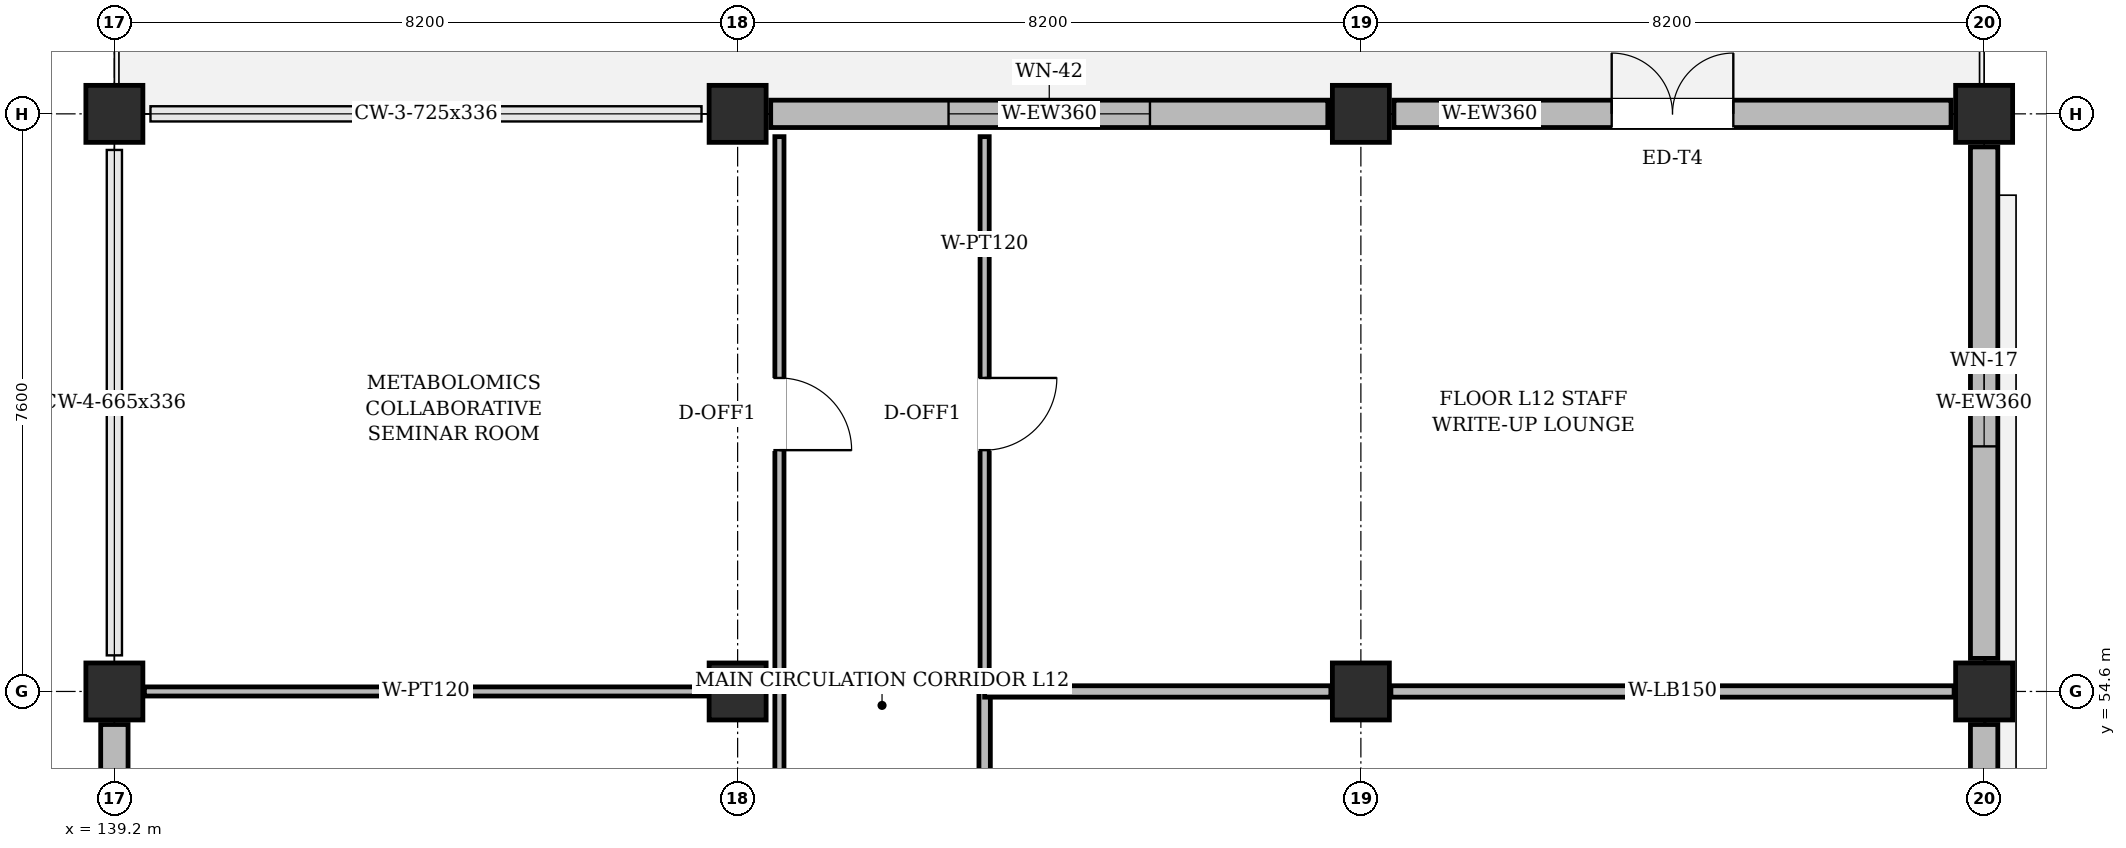
"""IFC4 building model, lengths in metres.
Left out: names, types, materials, properties, quantities, classifications, styles, units other than length and angle.
Written with IfcOpenShell. Run it as: python <this file> out.ifc"""

import sys

from ifc_helpers import new_model, si_unit, direction, frame, frame_2d, origin, origin_2d, place, context, subcontext, project, spatial, rectangle, extrude, element, fill, save


model = new_model("IFC4")
c1 = context("Model", 3, precision=1e-05, world=origin(), true_north=direction((0.0, 1.0)))
c2 = subcontext(c1, "Body", "Model", "MODEL_VIEW")
j1 = project(units=[si_unit("LENGTHUNIT", "METRE"), si_unit("PLANEANGLEUNIT", "RADIAN")], contexts=[c1])
p1 = place(None, origin())
s1 = spatial("IfcSite", under=j1, at=p1, CompositionType="ELEMENT")
p2 = place(p1, origin())
s2 = spatial("IfcBuilding", under=s1, at=p2, CompositionType="ELEMENT")
p3 = place(p2, frame((0.0, 0.0, 53.4)))
s3 = spatial("IfcBuildingStorey", under=s2, at=p3, CompositionType="ELEMENT", Elevation=53.4)
for number, where, z_axis, x_axis in (
    (1, (139.2, 54.6, 0.0), (0.0, 0.0, 1.0), (1.0, 0.0, 0.0)),
    (2, (139.2, 62.2, 0.0), (0.0, 0.0, 1.0), (1.0, 0.0, 0.0)),
    (3, (147.4, 54.6, 0.0), (0.0, 0.0, 1.0), (1.0, 0.0, 0.0)),
    (4, (147.4, 62.2, 0.0), (0.0, 0.0, 1.0), (1.0, 0.0, 0.0)),
    (5, (155.6, 54.6, 0.0), (0.0, 0.0, 1.0), (1.0, 0.0, 0.0)),
    (6, (155.6, 62.2, 0.0), (0.0, 0.0, 1.0), (1.0, 0.0, 0.0)),
    (7, (163.8, 54.6, 0.0), (0.0, 0.0, 1.0), (1.0, 0.0, 0.0)),
    (8, (163.8, 62.2, 0.0), (0.0, 0.0, 1.0), (1.0, 0.0, 0.0)),
):
    element("IfcColumn", number, at=place(p3, frame(where, z_axis=z_axis, x_axis=x_axis)), inside=s3, PredefinedType="COLUMN", context=c2, shape_type="SweptSolid", body=[
        extrude(rectangle(XDim=0.75, YDim=0.75, at=origin_2d()), origin(), (0.0, 0.0, 1.0), 3.96),
    ])
p4 = place(p3, frame((163.8, 47.435, 0.0), z_axis=(0.0, 0.0, 1.0), x_axis=(0.0, 1.0, 0.0)))
e9 = element("IfcWall", 9, at=p4, inside=s3, PredefinedType="SOLIDWALL", context=c2, shape_type="SweptSolid", body=[
    extrude(rectangle(XDim=6.73, YDim=0.36, at=frame_2d((3.365, 0.0))), origin(), (0.0, 0.0, 1.0), 3.345),
])
p5 = place(p4, frame((2.89, 0.0, 0.95)))
e10 = element("IfcOpeningElement", 10, at=p5, cuts=e9, PredefinedType="OPENING", context=c2, shape_type="SweptSolid", body=[
    extrude(rectangle(XDim=0.95, YDim=1.5, at=frame_2d((0.475, 0.75))), frame((0.0, 0.192, 0.0), z_axis=(0.0, -1.0, 0.0), x_axis=(1.0, 0.0, 0.0)), (0.0, 0.0, 1.0), 0.384),
])
p6 = place(p3, frame((163.8, 55.035, 0.0), z_axis=(0.0, 0.0, 1.0), x_axis=(0.0, 1.0, 0.0)))
e11 = element("IfcWall", 11, at=p6, inside=s3, PredefinedType="SOLIDWALL", context=c2, shape_type="SweptSolid", body=[
    extrude(rectangle(XDim=6.73, YDim=0.36, at=frame_2d((3.365, 0.0))), origin(), (0.0, 0.0, 1.0), 3.345),
])
p7 = place(p6, frame((2.79, 0.0, 0.95)))
e12 = element("IfcOpeningElement", 12, at=p7, cuts=e11, PredefinedType="OPENING", context=c2, shape_type="SweptSolid", body=[
    extrude(rectangle(XDim=1.15, YDim=1.25, at=frame_2d((0.575, 0.625))), frame((0.0, 0.192, 0.0), z_axis=(0.0, -1.0, 0.0), x_axis=(1.0, 0.0, 0.0)), (0.0, 0.0, 1.0), 0.384),
])
p8 = place(p3, frame((163.365, 62.2, 0.0), z_axis=(0.0, 0.0, 1.0), x_axis=(-1.0, 0.0, 0.0)))
e13 = element("IfcWall", 13, at=p8, inside=s3, PredefinedType="SOLIDWALL", context=c2, shape_type="SweptSolid", body=[
    extrude(rectangle(XDim=7.33, YDim=0.36, at=frame_2d((3.665, 0.0))), origin(), (0.0, 0.0, 1.0), 3.345),
])
p9 = place(p8, frame((2.865, 0.0, 0.0)))
e14 = element("IfcOpeningElement", 14, at=p9, cuts=e13, PredefinedType="OPENING", context=c2, shape_type="SweptSolid", body=[
    extrude(rectangle(XDim=1.6, YDim=2.2, at=frame_2d((0.8, 1.1))), frame((0.0, 0.192, 0.0), z_axis=(0.0, -1.0, 0.0), x_axis=(1.0, 0.0, 0.0)), (0.0, 0.0, 1.0), 0.384),
])
p10 = place(p3, frame((155.165, 62.2, 0.0), z_axis=(0.0, 0.0, 1.0), x_axis=(-1.0, 0.0, 0.0)))
e15 = element("IfcWall", 15, at=p10, inside=s3, PredefinedType="SOLIDWALL", context=c2, shape_type="SweptSolid", body=[
    extrude(rectangle(XDim=7.33, YDim=0.36, at=frame_2d((3.665, 0.0))), origin(), (0.0, 0.0, 1.0), 3.345),
])
p11 = place(p10, frame((2.34, 0.0, 0.95)))
e16 = element("IfcOpeningElement", 16, at=p11, cuts=e15, PredefinedType="OPENING", context=c2, shape_type="SweptSolid", body=[
    extrude(rectangle(XDim=2.65, YDim=1.5, at=frame_2d((1.325, 0.75))), frame((0.0, 0.192, 0.0), z_axis=(0.0, -1.0, 0.0), x_axis=(1.0, 0.0, 0.0)), (0.0, 0.0, 1.0), 0.384),
])
p12 = place(p3, frame((139.2, 54.165, 0.0), z_axis=(0.0, 0.0, 1.0), x_axis=(0.0, -1.0, 0.0)))
e17 = element("IfcWall", 17, at=p12, inside=s3, PredefinedType="SOLIDWALL", context=c2, shape_type="SweptSolid", body=[
    extrude(rectangle(XDim=6.73, YDim=0.36, at=frame_2d((3.365, 0.0))), origin(), (0.0, 0.0, 1.0), 3.345),
])
p13 = place(p12, frame((2.59, 0.0, 0.95)))
e18 = element("IfcOpeningElement", 18, at=p13, cuts=e17, PredefinedType="OPENING", context=c2, shape_type="SweptSolid", body=[
    extrude(rectangle(XDim=1.55, YDim=1.75, at=frame_2d((0.775, 0.875))), frame((0.0, 0.192, 0.0), z_axis=(0.0, -1.0, 0.0), x_axis=(1.0, 0.0, 0.0)), (0.0, 0.0, 1.0), 0.384),
])
p14 = place(p3, frame((150.65, 54.6, 0.0), z_axis=(0.0, 0.0, 1.0), x_axis=(0.0, -1.0, 0.0)))
e19 = element("IfcWall", 19, at=p14, inside=s3, PredefinedType="PARTITIONING", context=c2, shape_type="SweptSolid", body=[
    extrude(rectangle(XDim=18.35, YDim=0.15, at=frame_2d((9.175, 0.0))), origin(), (0.0, 0.0, 1.0), 3.805),
])
p15 = place(p14, frame((8.475, 0.0, 0.0)))
e20 = element("IfcOpeningElement", 20, at=p15, cuts=e19, PredefinedType="OPENING", context=c2, shape_type="SweptSolid", body=[
    extrude(rectangle(XDim=1.4, YDim=2.2, at=frame_2d((0.7, 1.1))), frame((0.0, 0.087, 0.0), z_axis=(0.0, -1.0, 0.0), x_axis=(1.0, 0.0, 0.0)), (0.0, 0.0, 1.0), 0.174),
])
p16 = place(p3, frame((147.95, 46.51, 0.0), z_axis=(0.0, 0.0, 1.0), x_axis=(0.0, 1.0, 0.0)))
e21 = element("IfcWall", 21, at=p16, inside=s3, PredefinedType="PARTITIONING", context=c2, shape_type="SweptSolid", body=[
    extrude(rectangle(XDim=8.09, YDim=0.12, at=frame_2d((4.045, 0.0))), origin(), (0.0, 0.0, 1.0), 3.805),
])
p17 = place(p16, frame((3.52, 0.0, 0.0)))
e22 = element("IfcOpeningElement", 22, at=p17, cuts=e21, PredefinedType="OPENING", context=c2, shape_type="SweptSolid", body=[
    extrude(rectangle(XDim=1.05, YDim=2.2, at=frame_2d((0.525, 1.1))), frame((0.0, 0.072, 0.0), z_axis=(0.0, -1.0, 0.0), x_axis=(1.0, 0.0, 0.0)), (0.0, 0.0, 1.0), 0.144),
])
p18 = place(p3, frame((147.95, 54.6, 0.0), z_axis=(0.0, 0.0, 1.0), x_axis=(0.0, 1.0, 0.0)))
e23 = element("IfcWall", 23, at=p18, inside=s3, PredefinedType="PARTITIONING", context=c2, shape_type="SweptSolid", body=[
    extrude(rectangle(XDim=7.3, YDim=0.12, at=frame_2d((3.65, 0.0))), origin(), (0.0, 0.0, 1.0), 3.805),
])
p19 = place(p18, frame((3.175, 0.0, 0.0)))
e24 = element("IfcOpeningElement", 24, at=p19, cuts=e23, PredefinedType="OPENING", context=c2, shape_type="SweptSolid", body=[
    extrude(rectangle(XDim=0.95, YDim=2.2, at=frame_2d((0.475, 1.1))), frame((0.0, 0.072, 0.0), z_axis=(0.0, -1.0, 0.0), x_axis=(1.0, 0.0, 0.0)), (0.0, 0.0, 1.0), 0.144),
])
p20 = place(p3, frame((150.65, 61.9, 0.0), z_axis=(0.0, 0.0, 1.0), x_axis=(0.0, -1.0, 0.0)))
e25 = element("IfcWall", 25, at=p20, inside=s3, PredefinedType="PARTITIONING", context=c2, shape_type="SweptSolid", body=[
    extrude(rectangle(XDim=7.3, YDim=0.12, at=frame_2d((3.65, 0.0))), origin(), (0.0, 0.0, 1.0), 3.805),
])
p21 = place(p20, frame((3.175, 0.0, 0.0)))
e26 = element("IfcOpeningElement", 26, at=p21, cuts=e25, PredefinedType="OPENING", context=c2, shape_type="SweptSolid", body=[
    extrude(rectangle(XDim=0.95, YDim=2.2, at=frame_2d((0.475, 1.1))), frame((0.0, 0.072, 0.0), z_axis=(0.0, -1.0, 0.0), x_axis=(1.0, 0.0, 0.0)), (0.0, 0.0, 1.0), 0.144),
])
p22 = place(p3, frame((150.65, 54.6, 0.0), z_axis=(0.0, 0.0, 1.0), x_axis=(1.0, 0.0, 0.0)))
e27 = element("IfcWall", 27, at=p22, inside=s3, PredefinedType="PARTITIONING", context=c2, shape_type="SweptSolid", body=[
    extrude(rectangle(XDim=4.555, YDim=0.15, at=frame_2d((2.278, 0.0))), origin(), (0.0, 0.0, 1.0), 3.295),
])
p23 = place(p3, frame((155.995, 54.6, 0.0), z_axis=(0.0, 0.0, 1.0), x_axis=(1.0, 0.0, 0.0)))
e28 = element("IfcWall", 28, at=p23, inside=s3, PredefinedType="PARTITIONING", context=c2, shape_type="SweptSolid", body=[
    extrude(rectangle(XDim=7.41, YDim=0.15, at=frame_2d((3.705, 0.0))), origin(), (0.0, 0.0, 1.0), 3.295),
])
p24 = place(p3, frame((139.595, 54.6, 0.0), z_axis=(0.0, 0.0, 1.0), x_axis=(1.0, 0.0, 0.0)))
e29 = element("IfcWall", 29, at=p24, inside=s3, PredefinedType="PARTITIONING", context=c2, shape_type="SweptSolid", body=[
    extrude(rectangle(XDim=7.41, YDim=0.12, at=frame_2d((3.705, 0.0))), origin(), (0.0, 0.0, 1.0), 3.295),
])
p25 = place(p7, origin())
e30 = element("IfcWindow", 30, at=p25, inside=s3, PartitioningType="SINGLE_PANEL", PredefinedType="WINDOW", context=c2, shape_type="SweptSolid", body=[
    extrude(rectangle(XDim=1.15, YDim=1.25, at=frame_2d((0.575, 0.625))), frame((0.0, 0.03, 0.0), z_axis=(0.0, -1.0, 0.0), x_axis=(1.0, 0.0, 0.0)), (0.0, 0.0, 1.0), 0.06),
])
fill(e12, e30)
p26 = place(p9, frame((1.6, 0.0, 0.0), z_axis=(0.0, 0.0, 1.0), x_axis=(-1.0, 0.0, 0.0)))
e31 = element("IfcDoor", 31, at=p26, inside=s3, OperationType="DOUBLE_DOOR_SINGLE_SWING", PredefinedType="DOOR", context=c2, shape_type="SweptSolid", body=[
    extrude(rectangle(XDim=1.6, YDim=2.2, at=frame_2d((0.8, 1.1))), frame((0.0, 0.025, 0.0), z_axis=(0.0, -1.0, 0.0), x_axis=(1.0, 0.0, 0.0)), (0.0, 0.0, 1.0), 0.05),
])
fill(e14, e31)
p27 = place(p11, origin())
e32 = element("IfcWindow", 32, at=p27, inside=s3, PartitioningType="DOUBLE_PANEL_VERTICAL", PredefinedType="WINDOW", context=c2, shape_type="SweptSolid", body=[
    extrude(rectangle(XDim=2.65, YDim=1.5, at=frame_2d((1.325, 0.75))), frame((0.0, 0.03, 0.0), z_axis=(0.0, -1.0, 0.0), x_axis=(1.0, 0.0, 0.0)), (0.0, 0.0, 1.0), 0.06),
])
fill(e16, e32)
p28 = place(p19, frame((0.95, 0.0, 0.0), z_axis=(0.0, 0.0, 1.0), x_axis=(-1.0, 0.0, 0.0)))
e33 = element("IfcDoor", 33, at=p28, inside=s3, OperationType="SINGLE_SWING_RIGHT", PredefinedType="DOOR", context=c2, shape_type="SweptSolid", body=[
    extrude(rectangle(XDim=0.95, YDim=2.2, at=frame_2d((0.475, 1.1))), frame((0.0, 0.025, 0.0), z_axis=(0.0, -1.0, 0.0), x_axis=(1.0, 0.0, 0.0)), (0.0, 0.0, 1.0), 0.05),
])
fill(e24, e33)
p29 = place(p21, origin())
e34 = element("IfcDoor", 34, at=p29, inside=s3, OperationType="SINGLE_SWING_LEFT", PredefinedType="DOOR", context=c2, shape_type="SweptSolid", body=[
    extrude(rectangle(XDim=0.95, YDim=2.2, at=frame_2d((0.475, 1.1))), frame((0.0, 0.025, 0.0), z_axis=(0.0, -1.0, 0.0), x_axis=(1.0, 0.0, 0.0)), (0.0, 0.0, 1.0), 0.05),
])
fill(e26, e34)
save(model, sys.argv[1])
